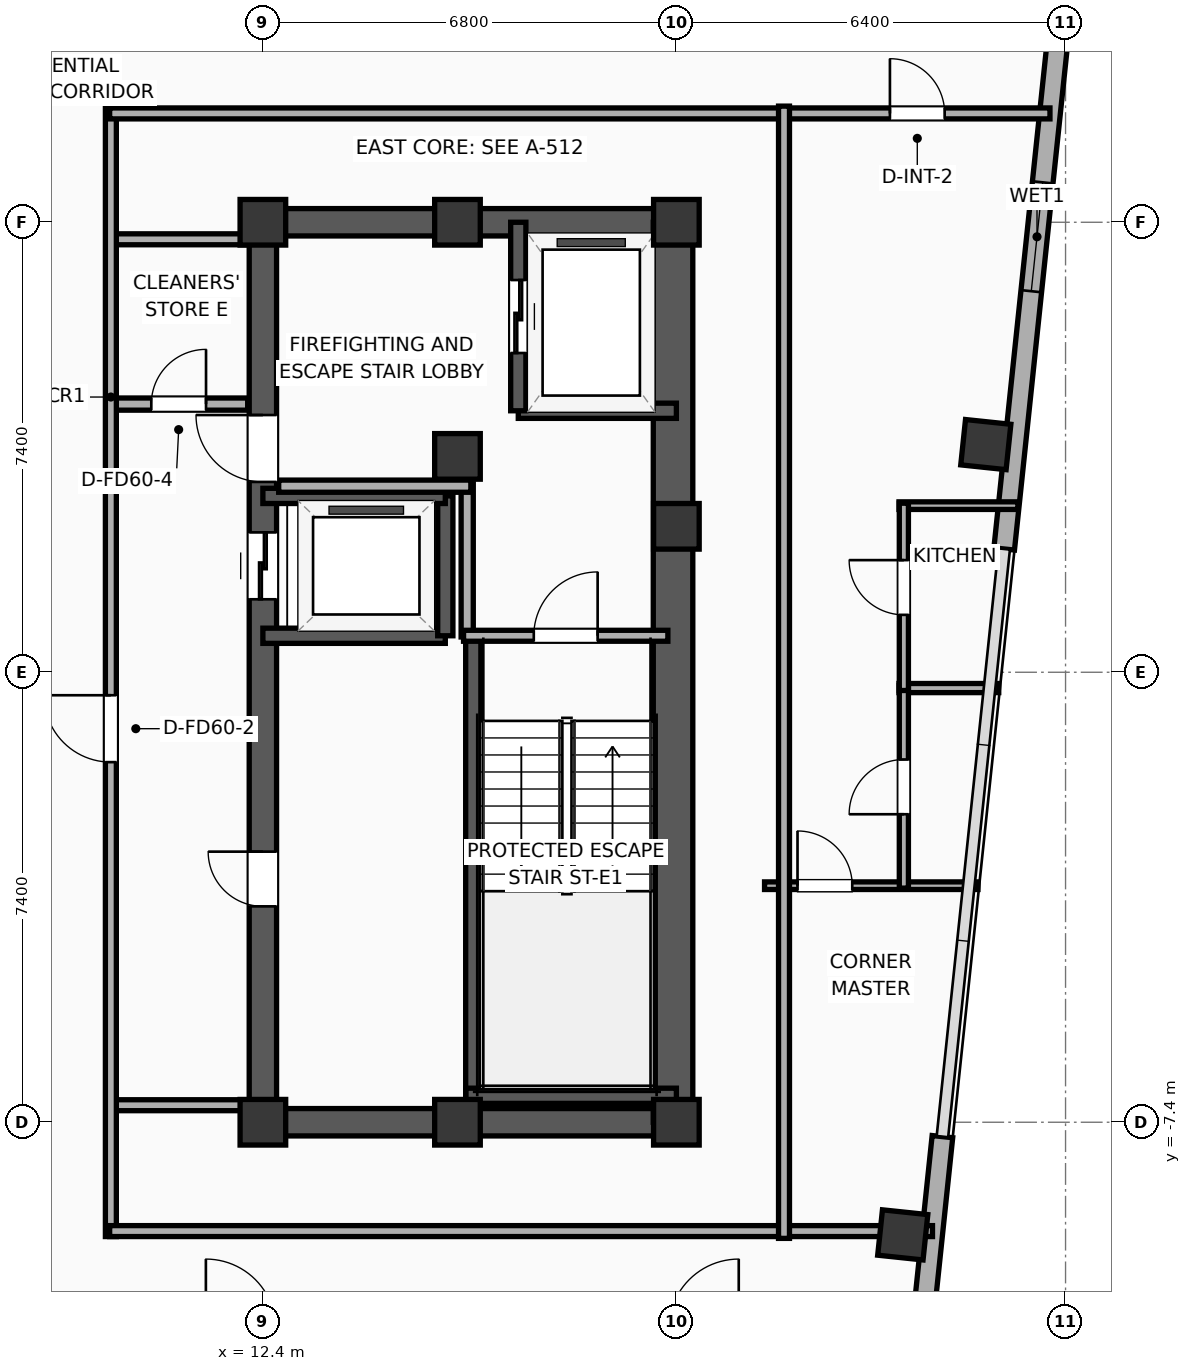
"""IFC4 building model, lengths in metres.
Left out: names, types, materials, properties, quantities, classifications, styles, units other than length and angle.
Written with IfcOpenShell. Run it as: python <this file> out.ifc"""

import sys

from ifc_helpers import new_model, si_unit, direction, frame, frame_2d, origin, origin_2d, place, context, subcontext, project, spatial, rectangle, hollow_rectangle, extrude, element, fill, save


model = new_model("IFC4")
c1 = context("Model", 3, precision=1e-05, world=origin(), true_north=direction((0.0, 1.0)))
c2 = subcontext(c1, "Body", "Model", "MODEL_VIEW")
j1 = project(units=[si_unit("LENGTHUNIT", "METRE"), si_unit("PLANEANGLEUNIT", "RADIAN")], contexts=[c1])
p1 = place(None, origin())
s1 = spatial("IfcSite", under=j1, at=p1, CompositionType="ELEMENT")
p2 = place(p1, origin())
s2 = spatial("IfcBuilding", under=s1, at=p2, CompositionType="ELEMENT")
p3 = place(p2, frame((0.0, 0.0, 275.6)))
s3 = spatial("IfcBuildingStorey", under=s2, at=p3, CompositionType="ELEMENT", Elevation=275.6)
for number, where, z_axis, x_axis in (
    (1, (12.4, -7.4, 0.0), (0.0, 0.0, 1.0), (1.0, 0.0, 0.0)),
    (2, (15.6, 3.55, 0.0), (0.0, 0.0, 1.0), (1.0, 0.0, 0.0)),
    (3, (12.4, 7.4, 0.0), (0.0, 0.0, 1.0), (1.0, 0.0, 0.0)),
    (4, (15.6, -7.4, 0.0), (0.0, 0.0, 1.0), (1.0, 0.0, 0.0)),
    (5, (15.6, 7.4, 0.0), (0.0, 0.0, 1.0), (1.0, 0.0, 0.0)),
    (6, (19.2, -7.4, 0.0), (0.0, 0.0, 1.0), (1.0, 0.0, 0.0)),
    (7, (19.2, 2.4, 0.0), (0.0, 0.0, 1.0), (1.0, 0.0, 0.0)),
    (8, (19.2, 7.4, 0.0), (0.0, 0.0, 1.0), (1.0, 0.0, 0.0)),
):
    element("IfcColumn", number, at=place(p3, frame(where, z_axis=z_axis, x_axis=x_axis)), inside=s3, PredefinedType="COLUMN", context=c2, shape_type="SweptSolid", body=[
        extrude(rectangle(XDim=0.75, YDim=0.75, at=origin_2d()), origin(), (0.0, 0.0, 1.0), 3.9),
    ])
for number, where, z_axis, x_axis in (
    (9, (12.175, -7.4, 0.0), (0.0, 0.0, 1.0), (1.0, 0.0, 0.0)),
    (10, (12.175, 7.4, 0.0), (0.0, 0.0, 1.0), (1.0, 0.0, 0.0)),
):
    element("IfcWall", number, at=place(p3, frame(where, z_axis=z_axis, x_axis=x_axis)), inside=s3, PredefinedType="SHEAR", context=c2, shape_type="SweptSolid", body=[
        extrude(rectangle(XDim=7.25, YDim=0.45, at=frame_2d((3.625, 0.0))), origin(), (0.0, 0.0, 1.0), 3.65),
    ])
p4 = place(p3, frame((12.4, -7.4, 0.0), z_axis=(0.0, 0.0, 1.0), x_axis=(0.0, 1.0, 0.0)))
e11 = element("IfcWall", 11, at=p4, inside=s3, PredefinedType="SHEAR", context=c2, shape_type="SweptSolid", body=[
    extrude(rectangle(XDim=14.8, YDim=0.45, at=frame_2d((7.4, 0.0))), origin(), (0.0, 0.0, 1.0), 3.65),
])
p5 = place(p4, frame((8.6, 0.0, 0.0)))
e12 = element("IfcOpeningElement", 12, at=p5, cuts=e11, PredefinedType="OPENING", context=c2, shape_type="SweptSolid", body=[
    extrude(rectangle(XDim=1.1, YDim=2.05, at=frame_2d((0.55, 1.025))), frame((0.0, 0.235, 0.0), z_axis=(0.0, -1.0, 0.0), x_axis=(1.0, 0.0, 0.0)), (0.0, 0.0, 1.0), 0.47),
])
p6 = place(p4, frame((10.53, 0.0, 0.0)))
e13 = element("IfcOpeningElement", 13, at=p6, cuts=e11, PredefinedType="OPENING", context=c2, shape_type="SweptSolid", body=[
    extrude(rectangle(XDim=1.1, YDim=2.05, at=frame_2d((0.55, 1.025))), frame((0.0, 0.235, 0.0), z_axis=(0.0, -1.0, 0.0), x_axis=(1.0, 0.0, 0.0)), (0.0, 0.0, 1.0), 0.47),
])
p7 = place(p4, frame((3.55, 0.0, 0.0)))
e14 = element("IfcOpeningElement", 14, at=p7, cuts=e11, PredefinedType="OPENING", context=c2, shape_type="SweptSolid", body=[
    extrude(rectangle(XDim=0.9, YDim=2.05, at=frame_2d((0.45, 1.025))), frame((0.0, 0.235, 0.0), z_axis=(0.0, -1.0, 0.0), x_axis=(1.0, 0.0, 0.0)), (0.0, 0.0, 1.0), 0.47),
])
p8 = place(p3, frame((19.145, -7.4, 0.0), z_axis=(0.0, 0.0, 1.0), x_axis=(0.0, 1.0, 0.0)))
e15 = element("IfcWall", 15, at=p8, inside=s3, PredefinedType="SHEAR", context=c2, shape_type="SweptSolid", body=[
    extrude(rectangle(XDim=14.8, YDim=0.65, at=frame_2d((7.4, 0.0))), origin(), (0.0, 0.0, 1.0), 3.65),
])
p9 = place(p3, frame((15.86, -7.085, 0.0), z_axis=(0.0, 0.0, 1.0), x_axis=(0.0, 1.0, 0.0)))
e16 = element("IfcWall", 16, at=p9, inside=s3, PredefinedType="SOLIDWALL", context=c2, shape_type="SweptSolid", body=[
    extrude(rectangle(XDim=7.685, YDim=0.25, at=frame_2d((3.843, 0.0))), origin(), (0.0, 0.0, 1.0), 3.65),
])
p10 = place(p3, frame((15.74, -6.965, 0.0), z_axis=(0.0, 0.0, 1.0), x_axis=(1.0, 0.0, 0.0)))
e17 = element("IfcWall", 17, at=p10, inside=s3, PredefinedType="SOLIDWALL", context=c2, shape_type="SweptSolid", body=[
    extrude(rectangle(XDim=3.46, YDim=0.25, at=frame_2d((1.73, 0.0))), origin(), (0.0, 0.0, 1.0), 3.65),
])
for number, where, z_axis, x_axis in (
    (18, (22.923, -9.252, 0.0), (0.0, 0.0, 1.0), (0.995, -0.105, 0.0)),
    (19, (24.289, 3.744, 0.0), (0.0, 0.0, 1.0), (0.995, -0.105, 0.0)),
):
    element("IfcColumn", number, at=place(p3, frame(where, z_axis=z_axis, x_axis=x_axis)), inside=s3, PredefinedType="COLUMN", context=c2, shape_type="SweptSolid", body=[
        extrude(hollow_rectangle(XDim=0.75, YDim=0.75, WallThickness=0.025, at=origin_2d()), origin(), (0.0, 0.0, 1.0), 3.9),
    ])
p11 = place(p3, frame((25.67, 12.296, 0.0), z_axis=(0.0, 0.0, 1.0), x_axis=(-0.104540767082, -0.994520602108, 0.0)))
e20 = element("IfcWall", 20, at=p11, inside=s3, PredefinedType="ELEMENTEDWALL", context=c2, shape_type="SweptSolid", body=[
    extrude(rectangle(XDim=10.325, YDim=0.34, at=frame_2d((5.162, 0.0))), origin(), (0.0, 0.0, 1.0), 3.65),
])
p12 = place(p11, frame((4.262, 0.0, 0.75)))
e21 = element("IfcOpeningElement", 21, at=p12, cuts=e20, PredefinedType="OPENING", context=c2, shape_type="SweptSolid", body=[
    extrude(rectangle(XDim=1.8, YDim=2.1, at=frame_2d((0.9, 1.05))), frame((0.0, 0.18, 0.0), z_axis=(0.0, -1.0, 0.0), x_axis=(1.0, 0.0, 0.0)), (0.0, 0.0, 1.0), 0.36),
])
p13 = place(p3, frame((23.575, -7.636, 0.0), z_axis=(0.0, 0.0, 1.0), x_axis=(-0.104540767082, -0.994520602108, 0.0)))
e22 = element("IfcWall", 22, at=p13, inside=s3, PredefinedType="ELEMENTEDWALL", context=c2, shape_type="SweptSolid", body=[
    extrude(rectangle(XDim=10.325, YDim=0.34, at=frame_2d((5.162, 0.0))), origin(), (0.0, 0.0, 1.0), 3.65),
])
p14 = place(p13, frame((4.262, 0.0, 0.75)))
e23 = element("IfcOpeningElement", 23, at=p14, cuts=e22, PredefinedType="OPENING", context=c2, shape_type="SweptSolid", body=[
    extrude(rectangle(XDim=1.8, YDim=2.1, at=frame_2d((0.9, 1.05))), frame((0.0, 0.18, 0.0), z_axis=(0.0, -1.0, 0.0), x_axis=(1.0, 0.0, 0.0)), (0.0, 0.0, 1.0), 0.36),
])
p15 = place(p13, frame((7.326, 0.0, 0.75)))
e24 = element("IfcOpeningElement", 24, at=p15, cuts=e22, PredefinedType="OPENING", context=c2, shape_type="SweptSolid", body=[
    extrude(rectangle(XDim=1.2, YDim=2.05, at=frame_2d((0.6, 1.025))), frame((0.0, 0.18, 0.0), z_axis=(0.0, -1.0, 0.0), x_axis=(1.0, 0.0, 0.0)), (0.0, 0.0, 1.0), 0.36),
])
p16 = place(p3, frame((16.6, 4.3, 0.0), z_axis=(0.0, 0.0, 1.0), x_axis=(1.0, 0.0, 0.0)))
e25 = element("IfcWall", 25, at=p16, inside=s3, PredefinedType="SOLIDWALL", context=c2, shape_type="SweptSolid", body=[
    extrude(rectangle(XDim=2.6, YDim=0.25, at=frame_2d((1.3, 0.0))), origin(), (0.0, 0.0, 1.0), 3.65),
])
p17 = place(p3, frame((16.6, 7.4, 0.0), z_axis=(0.0, 0.0, 1.0), x_axis=(0.0, -1.0, 0.0)))
e26 = element("IfcWall", 26, at=p17, inside=s3, PredefinedType="SOLIDWALL", context=c2, shape_type="SweptSolid", body=[
    extrude(rectangle(XDim=3.1, YDim=0.25, at=frame_2d((1.55, 0.0))), origin(), (0.0, 0.0, 1.0), 3.65),
])
p18 = place(p17, frame((0.95, 0.0, 0.0)))
e27 = element("IfcOpeningElement", 27, at=p18, cuts=e26, PredefinedType="OPENING", context=c2, shape_type="SweptSolid", body=[
    extrude(rectangle(XDim=1.2, YDim=2.05, at=frame_2d((0.6, 1.025))), frame((0.0, 0.135, 0.0), z_axis=(0.0, -1.0, 0.0), x_axis=(1.0, 0.0, 0.0)), (0.0, 0.0, 1.0), 0.27),
])
p19 = place(p3, frame((12.4, 0.6, 0.0), z_axis=(0.0, 0.0, 1.0), x_axis=(1.0, 0.0, 0.0)))
e28 = element("IfcWall", 28, at=p19, inside=s3, PredefinedType="SOLIDWALL", context=c2, shape_type="SweptSolid", body=[
    extrude(rectangle(XDim=3.0, YDim=0.25, at=frame_2d((1.5, 0.0))), origin(), (0.0, 0.0, 1.0), 3.65),
])
p20 = place(p3, frame((15.4, 0.6, 0.0), z_axis=(0.0, 0.0, 1.0), x_axis=(0.0, 1.0, 0.0)))
e29 = element("IfcWall", 29, at=p20, inside=s3, PredefinedType="SOLIDWALL", context=c2, shape_type="SweptSolid", body=[
    extrude(rectangle(XDim=2.3, YDim=0.25, at=frame_2d((1.15, 0.0))), origin(), (0.0, 0.0, 1.0), 3.65),
])
p21 = place(p3, frame((15.4, 2.9, 0.0), z_axis=(0.0, 0.0, 1.0), x_axis=(-1.0, 0.0, 0.0)))
e30 = element("IfcWall", 30, at=p21, inside=s3, PredefinedType="SOLIDWALL", context=c2, shape_type="SweptSolid", body=[
    extrude(rectangle(XDim=3.0, YDim=0.25, at=frame_2d((1.5, 0.0))), origin(), (0.0, 0.0, 1.0), 3.65),
])
p22 = place(p3, frame((15.76, 0.58, 0.0), z_axis=(0.0, 0.0, 1.0), x_axis=(0.0, 1.0, 0.0)))
e31 = element("IfcWall", 31, at=p22, inside=s3, PredefinedType="PARTITIONING", context=c2, shape_type="SweptSolid", body=[
    extrude(rectangle(XDim=2.52, YDim=0.2, at=frame_2d((1.26, 0.0))), origin(), (0.0, 0.0, 1.0), 3.65),
])
p23 = place(p3, frame((12.66, 3.06, 0.0), z_axis=(0.0, 0.0, 1.0), x_axis=(1.0, 0.0, 0.0)))
e32 = element("IfcWall", 32, at=p23, inside=s3, PredefinedType="PARTITIONING", context=c2, shape_type="SweptSolid", body=[
    extrude(rectangle(XDim=3.16, YDim=0.2, at=frame_2d((1.58, 0.0))), origin(), (0.0, 0.0, 1.0), 3.65),
])
p24 = place(p3, frame((15.7, 0.6, 0.0), z_axis=(0.0, 0.0, 1.0), x_axis=(1.0, 0.0, 0.0)))
e33 = element("IfcWall", 33, at=p24, inside=s3, PredefinedType="PARTITIONING", context=c2, shape_type="SweptSolid", body=[
    extrude(rectangle(XDim=3.36, YDim=0.18, at=frame_2d((1.68, 0.0))), origin(), (0.0, 0.0, 1.0), 3.65),
])
p25 = place(p24, frame((1.155, 0.0, 0.0)))
e34 = element("IfcOpeningElement", 34, at=p25, cuts=e33, PredefinedType="OPENING", context=c2, shape_type="SweptSolid", body=[
    extrude(rectangle(XDim=1.05, YDim=2.05, at=frame_2d((0.525, 1.025))), frame((0.0, 0.1, 0.0), z_axis=(0.0, -1.0, 0.0), x_axis=(1.0, 0.0, 0.0)), (0.0, 0.0, 1.0), 0.2),
])
p26 = place(p3, frame((9.88, 4.41, 0.0), z_axis=(0.0, 0.0, 1.0), x_axis=(1.0, 0.0, 0.0)))
e35 = element("IfcWall", 35, at=p26, inside=s3, PredefinedType="PARTITIONING", context=c2, shape_type="SweptSolid", body=[
    extrude(rectangle(XDim=2.27, YDim=0.2, at=frame_2d((1.135, 0.0))), origin(), (0.0, 0.0, 1.0), 3.65),
])
p27 = place(p26, frame((0.685, 0.0, 0.0)))
e36 = element("IfcOpeningElement", 36, at=p27, cuts=e35, PredefinedType="OPENING", context=c2, shape_type="SweptSolid", body=[
    extrude(rectangle(XDim=0.9, YDim=2.05, at=frame_2d((0.45, 1.025))), frame((0.0, 0.11, 0.0), z_axis=(0.0, -1.0, 0.0), x_axis=(1.0, 0.0, 0.0)), (0.0, 0.0, 1.0), 0.22),
])
for number, where, z_axis, x_axis in (
    (37, (9.88, 7.12, 0.0), (0.0, 0.0, 1.0), (1.0, 0.0, 0.0)),
    (38, (9.88, -7.12, 0.0), (0.0, 0.0, 1.0), (1.0, 0.0, 0.0)),
):
    element("IfcWall", number, at=place(p3, frame(where, z_axis=z_axis, x_axis=x_axis)), inside=s3, PredefinedType="PARTITIONING", context=c2, shape_type="SweptSolid", body=[
        extrude(rectangle(XDim=2.27, YDim=0.18, at=frame_2d((1.135, 0.0))), origin(), (0.0, 0.0, 1.0), 3.65),
    ])
p28 = place(p3, frame((9.9, -9.28, 0.0), z_axis=(0.0, 0.0, 1.0), x_axis=(0.0, 1.0, 0.0)))
e39 = element("IfcWall", 39, at=p28, inside=s3, PredefinedType="PARTITIONING", context=c2, shape_type="SweptSolid", body=[
    extrude(rectangle(XDim=18.56, YDim=0.18, at=frame_2d((9.28, 0.0))), origin(), (0.0, 0.0, 1.0), 3.65),
])
p29 = place(p28, frame((7.802, 0.0, 0.0)))
e40 = element("IfcOpeningElement", 40, at=p29, cuts=e39, PredefinedType="OPENING", context=c2, shape_type="SweptSolid", body=[
    extrude(rectangle(XDim=1.1, YDim=2.05, at=frame_2d((0.55, 1.025))), frame((0.0, 0.1, 0.0), z_axis=(0.0, -1.0, 0.0), x_axis=(1.0, 0.0, 0.0)), (0.0, 0.0, 1.0), 0.2),
])
p30 = place(p3, frame((9.88, 9.19, 0.0), z_axis=(0.0, 0.0, 1.0), x_axis=(1.0, 0.0, 0.0)))
e41 = element("IfcWall", 41, at=p30, inside=s3, PredefinedType="PARTITIONING", context=c2, shape_type="SweptSolid", body=[
    extrude(rectangle(XDim=15.464, YDim=0.18, at=frame_2d((7.732, 0.0))), origin(), (0.0, 0.0, 1.0), 3.65),
])
p31 = place(p30, frame((12.832, 0.0, 0.0)))
e42 = element("IfcOpeningElement", 42, at=p31, cuts=e41, PredefinedType="OPENING", context=c2, shape_type="SweptSolid", body=[
    extrude(rectangle(XDim=0.9, YDim=2.05, at=frame_2d((0.45, 1.025))), frame((0.0, 0.1, 0.0), z_axis=(0.0, -1.0, 0.0), x_axis=(1.0, 0.0, 0.0)), (0.0, 0.0, 1.0), 0.2),
])
p32 = place(p3, frame((9.88, -9.19, 0.0), z_axis=(0.0, 0.0, 1.0), x_axis=(1.0, 0.0, 0.0)))
e43 = element("IfcWall", 43, at=p32, inside=s3, PredefinedType="PARTITIONING", context=c2, shape_type="SweptSolid", body=[
    extrude(rectangle(XDim=13.532, YDim=0.18, at=frame_2d((6.766, 0.0))), origin(), (0.0, 0.0, 1.0), 3.65),
])
p33 = place(p3, frame((22.861, 2.74, 0.0), z_axis=(0.0, 0.0, 1.0), x_axis=(1.0, 0.0, 0.0)))
e44 = element("IfcWall", 44, at=p33, inside=s3, PredefinedType="PARTITIONING", context=c2, shape_type="SweptSolid", body=[
    extrude(rectangle(XDim=1.956, YDim=0.125, at=frame_2d((0.978, 0.0))), origin(), (0.0, 0.0, 1.0), 3.65),
])
p34 = place(p3, frame((22.861, -0.26, 0.0), z_axis=(0.0, 0.0, 1.0), x_axis=(1.0, 0.0, 0.0)))
e45 = element("IfcWall", 45, at=p34, inside=s3, PredefinedType="PLUMBINGWALL", context=c2, shape_type="SweptSolid", body=[
    extrude(rectangle(XDim=1.64, YDim=0.15, at=frame_2d((0.82, 0.0))), origin(), (0.0, 0.0, 1.0), 3.65),
])
p35 = place(p3, frame((20.65, -3.51, 0.0), z_axis=(0.0, 0.0, 1.0), x_axis=(1.0, 0.0, 0.0)))
e46 = element("IfcWall", 46, at=p35, inside=s3, PredefinedType="PARTITIONING", context=c2, shape_type="SweptSolid", body=[
    extrude(rectangle(XDim=3.51, YDim=0.125, at=frame_2d((1.755, 0.0))), origin(), (0.0, 0.0, 1.0), 3.65),
])
p36 = place(p35, frame((0.542, 0.0, 0.0)))
e47 = element("IfcOpeningElement", 47, at=p36, cuts=e46, PredefinedType="OPENING", context=c2, shape_type="SweptSolid", body=[
    extrude(rectangle(XDim=0.9, YDim=2.05, at=frame_2d((0.45, 1.025))), frame((0.0, 0.073, 0.0), z_axis=(0.0, -1.0, 0.0), x_axis=(1.0, 0.0, 0.0)), (0.0, 0.0, 1.0), 0.145),
])
p37 = place(p3, frame((22.941, -3.55, 0.0), z_axis=(0.0, 0.0, 1.0), x_axis=(0.0, 1.0, 0.0)))
e48 = element("IfcWall", 48, at=p37, inside=s3, PredefinedType="PLUMBINGWALL", context=c2, shape_type="SweptSolid", body=[
    extrude(rectangle(XDim=3.33, YDim=0.15, at=frame_2d((1.665, 0.0))), origin(), (0.0, 0.0, 1.0), 3.65),
])
p38 = place(p37, frame((1.215, 0.0, 0.0)))
e49 = element("IfcOpeningElement", 49, at=p38, cuts=e48, PredefinedType="OPENING", context=c2, shape_type="SweptSolid", body=[
    extrude(rectangle(XDim=0.9, YDim=2.05, at=frame_2d((0.45, 1.025))), frame((0.0, 0.085, 0.0), z_axis=(0.0, -1.0, 0.0), x_axis=(1.0, 0.0, 0.0)), (0.0, 0.0, 1.0), 0.17),
])
p39 = place(p3, frame((22.941, -0.3, 0.0), z_axis=(0.0, 0.0, 1.0), x_axis=(0.0, 1.0, 0.0)))
e50 = element("IfcWall", 50, at=p39, inside=s3, PredefinedType="PLUMBINGWALL", context=c2, shape_type="SweptSolid", body=[
    extrude(rectangle(XDim=3.08, YDim=0.15, at=frame_2d((1.54, 0.0))), origin(), (0.0, 0.0, 1.0), 3.65),
])
p40 = place(p39, frame((1.244, 0.0, 0.0)))
e51 = element("IfcOpeningElement", 51, at=p40, cuts=e50, PredefinedType="OPENING", context=c2, shape_type="SweptSolid", body=[
    extrude(rectangle(XDim=0.9, YDim=2.05, at=frame_2d((0.45, 1.025))), frame((0.0, 0.085, 0.0), z_axis=(0.0, -1.0, 0.0), x_axis=(1.0, 0.0, 0.0)), (0.0, 0.0, 1.0), 0.17),
])
p41 = place(p3, frame((20.97, -9.31, 0.0), z_axis=(0.0, 0.0, 1.0), x_axis=(0.0, 1.0, 0.0)))
e52 = element("IfcWall", 52, at=p41, inside=s3, PredefinedType="PARTITIONING", context=c2, shape_type="SweptSolid", body=[
    extrude(rectangle(XDim=18.62, YDim=0.18, at=frame_2d((9.31, 0.0))), origin(), (0.0, 0.0, 1.0), 3.65),
])
p42 = place(p12, origin())
e53 = element("IfcWindow", 53, at=p42, inside=s3, PartitioningType="SINGLE_PANEL", PredefinedType="WINDOW", context=c2, shape_type="SweptSolid", body=[
    extrude(rectangle(XDim=1.8, YDim=2.1, at=frame_2d((0.9, 1.05))), frame((0.0, 0.03, 0.0), z_axis=(0.0, -1.0, 0.0), x_axis=(1.0, 0.0, 0.0)), (0.0, 0.0, 1.0), 0.06),
])
fill(e21, e53)
p43 = place(p18, origin())
e54 = element("IfcDoor", 54, at=p43, inside=s3, OperationType="SLIDING_TO_LEFT", PredefinedType="DOOR", context=c2, shape_type="SweptSolid", body=[
    extrude(rectangle(XDim=1.2, YDim=2.05, at=frame_2d((0.6, 1.025))), frame((0.0, 0.025, 0.0), z_axis=(0.0, -1.0, 0.0), x_axis=(1.0, 0.0, 0.0)), (0.0, 0.0, 1.0), 0.05),
])
fill(e27, e54)
p44 = place(p5, origin())
e55 = element("IfcDoor", 55, at=p44, inside=s3, OperationType="SLIDING_TO_LEFT", PredefinedType="DOOR", context=c2, shape_type="SweptSolid", body=[
    extrude(rectangle(XDim=1.1, YDim=2.05, at=frame_2d((0.55, 1.025))), frame((0.0, 0.025, 0.0), z_axis=(0.0, -1.0, 0.0), x_axis=(1.0, 0.0, 0.0)), (0.0, 0.0, 1.0), 0.05),
])
fill(e12, e55)
p45 = place(p25, origin())
e56 = element("IfcDoor", 56, at=p45, inside=s3, OperationType="SINGLE_SWING_RIGHT", PredefinedType="DOOR", context=c2, shape_type="SweptSolid", body=[
    extrude(rectangle(XDim=1.05, YDim=2.05, at=frame_2d((0.525, 1.025))), frame((0.0, 0.025, 0.0), z_axis=(0.0, -1.0, 0.0), x_axis=(1.0, 0.0, 0.0)), (0.0, 0.0, 1.0), 0.05),
])
fill(e34, e56)
p46 = place(p27, origin())
e57 = element("IfcDoor", 57, at=p46, inside=s3, OperationType="SINGLE_SWING_RIGHT", PredefinedType="DOOR", context=c2, shape_type="SweptSolid", body=[
    extrude(rectangle(XDim=0.9, YDim=2.05, at=frame_2d((0.45, 1.025))), frame((0.0, 0.025, 0.0), z_axis=(0.0, -1.0, 0.0), x_axis=(1.0, 0.0, 0.0)), (0.0, 0.0, 1.0), 0.05),
])
fill(e36, e57)
p47 = place(p29, origin())
e58 = element("IfcDoor", 58, at=p47, inside=s3, OperationType="SINGLE_SWING_RIGHT", PredefinedType="DOOR", context=c2, shape_type="SweptSolid", body=[
    extrude(rectangle(XDim=1.1, YDim=2.05, at=frame_2d((0.55, 1.025))), frame((0.0, 0.025, 0.0), z_axis=(0.0, -1.0, 0.0), x_axis=(1.0, 0.0, 0.0)), (0.0, 0.0, 1.0), 0.05),
])
fill(e40, e58)
p48 = place(p31, origin())
e59 = element("IfcDoor", 59, at=p48, inside=s3, OperationType="SINGLE_SWING_LEFT", PredefinedType="DOOR", context=c2, shape_type="SweptSolid", body=[
    extrude(rectangle(XDim=0.9, YDim=2.05, at=frame_2d((0.45, 1.025))), frame((0.0, 0.025, 0.0), z_axis=(0.0, -1.0, 0.0), x_axis=(1.0, 0.0, 0.0)), (0.0, 0.0, 1.0), 0.05),
])
fill(e42, e59)
p49 = place(p36, origin())
e60 = element("IfcDoor", 60, at=p49, inside=s3, OperationType="SINGLE_SWING_LEFT", PredefinedType="DOOR", context=c2, shape_type="SweptSolid", body=[
    extrude(rectangle(XDim=0.9, YDim=2.05, at=frame_2d((0.45, 1.025))), frame((0.0, 0.025, 0.0), z_axis=(0.0, -1.0, 0.0), x_axis=(1.0, 0.0, 0.0)), (0.0, 0.0, 1.0), 0.05),
])
fill(e47, e60)
p50 = place(p38, origin())
e61 = element("IfcDoor", 61, at=p50, inside=s3, OperationType="SINGLE_SWING_LEFT", PredefinedType="DOOR", context=c2, shape_type="SweptSolid", body=[
    extrude(rectangle(XDim=0.9, YDim=2.05, at=frame_2d((0.45, 1.025))), frame((0.0, 0.025, 0.0), z_axis=(0.0, -1.0, 0.0), x_axis=(1.0, 0.0, 0.0)), (0.0, 0.0, 1.0), 0.05),
])
fill(e49, e61)
p51 = place(p40, origin())
e62 = element("IfcDoor", 62, at=p51, inside=s3, OperationType="SINGLE_SWING_RIGHT", PredefinedType="DOOR", context=c2, shape_type="SweptSolid", body=[
    extrude(rectangle(XDim=0.9, YDim=2.05, at=frame_2d((0.45, 1.025))), frame((0.0, 0.025, 0.0), z_axis=(0.0, -1.0, 0.0), x_axis=(1.0, 0.0, 0.0)), (0.0, 0.0, 1.0), 0.05),
])
fill(e51, e62)
p52 = place(p6, origin())
e63 = element("IfcDoor", 63, at=p52, inside=s3, OperationType="SINGLE_SWING_RIGHT", PredefinedType="DOOR", context=c2, shape_type="SweptSolid", body=[
    extrude(rectangle(XDim=1.1, YDim=2.05, at=frame_2d((0.55, 1.025))), frame((0.0, 0.025, 0.0), z_axis=(0.0, -1.0, 0.0), x_axis=(1.0, 0.0, 0.0)), (0.0, 0.0, 1.0), 0.05),
])
fill(e13, e63)
p53 = place(p7, origin())
e64 = element("IfcDoor", 64, at=p53, inside=s3, OperationType="SINGLE_SWING_RIGHT", PredefinedType="DOOR", context=c2, shape_type="SweptSolid", body=[
    extrude(rectangle(XDim=0.9, YDim=2.05, at=frame_2d((0.45, 1.025))), frame((0.0, 0.025, 0.0), z_axis=(0.0, -1.0, 0.0), x_axis=(1.0, 0.0, 0.0)), (0.0, 0.0, 1.0), 0.05),
])
fill(e14, e64)
save(model, sys.argv[1])
